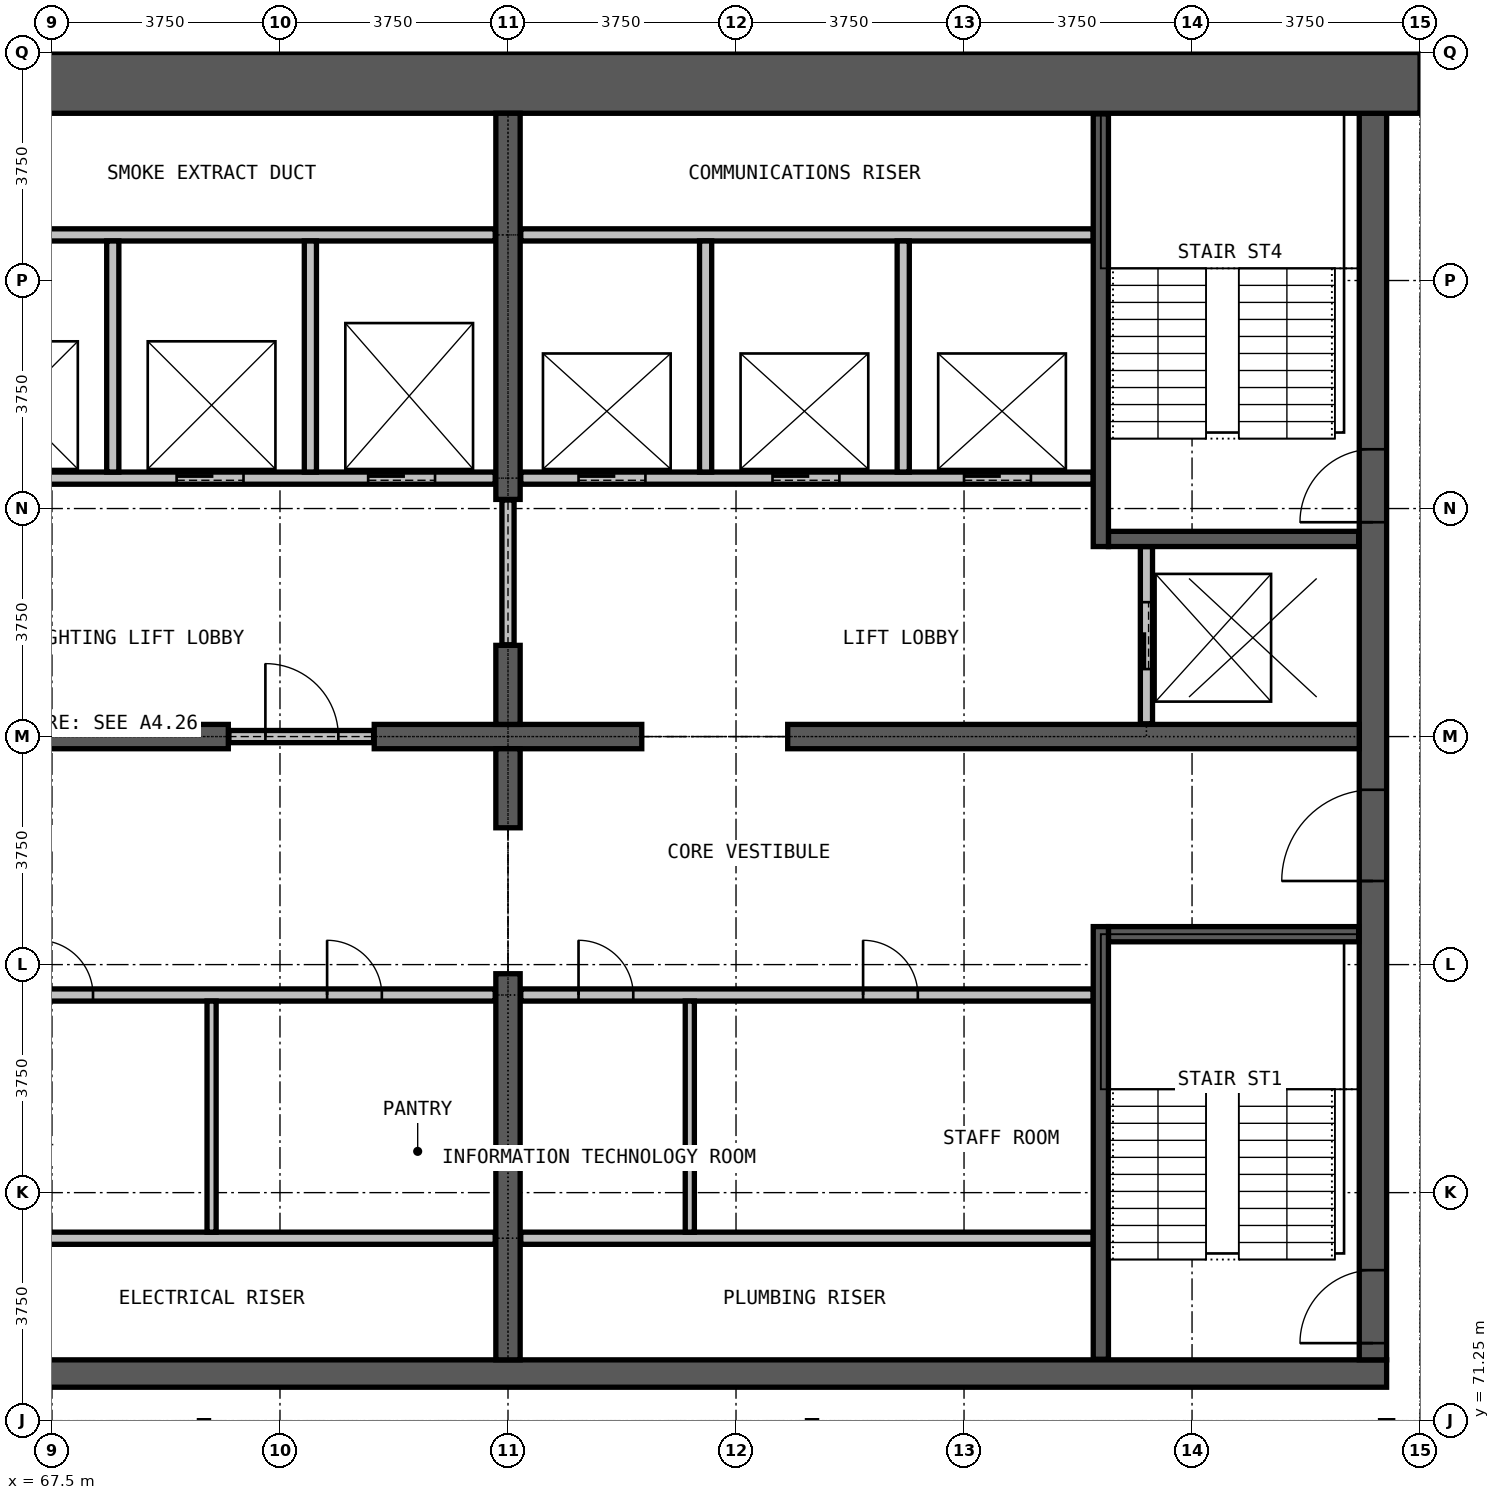
"""IFC4 building model, lengths in metres.
Left out: names, types, materials, properties, quantities, classifications, styles, units other than length and angle.
Written with IfcOpenShell. Run it as: python <this file> out.ifc"""

import sys

from ifc_helpers import new_model, si_unit, direction, frame, frame_2d, origin, place, context, subcontext, project, spatial, rectangle, extrude, element, fill, save


model = new_model("IFC4")
c1 = context("Model", 3, precision=1e-05, world=origin(), true_north=direction((0.0, 1.0)))
c2 = subcontext(c1, "Body", "Model", "MODEL_VIEW")
j1 = project(units=[si_unit("LENGTHUNIT", "METRE"), si_unit("PLANEANGLEUNIT", "RADIAN")], contexts=[c1])
p1 = place(None, origin())
s1 = spatial("IfcSite", under=j1, at=p1, CompositionType="ELEMENT")
p2 = place(p1, origin())
s2 = spatial("IfcBuilding", under=s1, at=p2, CompositionType="ELEMENT")
p3 = place(p2, frame((0.0, 0.0, 262.1)))
s3 = spatial("IfcBuildingStorey", under=s2, at=p3, CompositionType="ELEMENT", Elevation=262.1)
p4 = place(p3, frame((60.55, 72.025, 0.0), z_axis=(0.0, 0.0, 1.0), x_axis=(1.0, 0.0, 0.0)))
e1 = element("IfcWall", 1, at=p4, inside=s3, PredefinedType="SHEAR", context=c2, shape_type="SweptSolid", body=[
    extrude(rectangle(XDim=28.9, YDim=0.45, at=frame_2d((14.45, 0.0))), origin(), (0.0, 0.0, 1.0), 3.6),
])
p5 = place(p3, frame((89.225, 72.25, 0.0), z_axis=(0.0, 0.0, 1.0), x_axis=(0.0, 1.0, 0.0)))
e2 = element("IfcWall", 2, at=p5, inside=s3, PredefinedType="SHEAR", context=c2, shape_type="SweptSolid", body=[
    extrude(rectangle(XDim=20.5, YDim=0.45, at=frame_2d((10.25, 0.0))), origin(), (0.0, 0.0, 1.0), 3.6),
])
p6 = place(p5, frame((0.275, 0.0, 0.0)))
e3 = element("IfcOpeningElement", 3, at=p6, cuts=e2, PredefinedType="OPENING", context=c2, shape_type="SweptSolid", body=[
    extrude(rectangle(XDim=1.2, YDim=2.2, at=frame_2d((0.6, 1.1))), frame((0.0, 0.235, 0.0), z_axis=(0.0, -1.0, 0.0), x_axis=(1.0, 0.0, 0.0)), (0.0, 0.0, 1.0), 0.47),
])
p7 = place(p5, frame((13.775, 0.0, 0.0)))
e4 = element("IfcOpeningElement", 4, at=p7, cuts=e2, PredefinedType="OPENING", context=c2, shape_type="SweptSolid", body=[
    extrude(rectangle(XDim=1.2, YDim=2.2, at=frame_2d((0.6, 1.1))), frame((0.0, 0.235, 0.0), z_axis=(0.0, -1.0, 0.0), x_axis=(1.0, 0.0, 0.0)), (0.0, 0.0, 1.0), 0.47),
])
p8 = place(p5, frame((7.875, 0.0, 0.0)))
e5 = element("IfcOpeningElement", 5, at=p8, cuts=e2, PredefinedType="OPENING", context=c2, shape_type="SweptSolid", body=[
    extrude(rectangle(XDim=1.5, YDim=2.2, at=frame_2d((0.75, 1.1))), frame((0.0, 0.235, 0.0), z_axis=(0.0, -1.0, 0.0), x_axis=(1.0, 0.0, 0.0)), (0.0, 0.0, 1.0), 0.47),
])
p9 = place(p3, frame((90.0, 93.25, 0.0), z_axis=(0.0, 0.0, 1.0), x_axis=(-1.0, 0.0, 0.0)))
e6 = element("IfcWall", 6, at=p9, inside=s3, PredefinedType="SHEAR", context=c2, shape_type="SweptSolid", body=[
    extrude(rectangle(XDim=30.0, YDim=1.0, at=frame_2d((15.0, 0.0))), origin(), (0.0, 0.0, 1.0), 3.6),
])
p10 = place(p3, frame((61.0, 82.5, 0.0), z_axis=(0.0, 0.0, 1.0), x_axis=(1.0, 0.0, 0.0)))
e7 = element("IfcWall", 7, at=p10, inside=s3, PredefinedType="SHEAR", context=c2, shape_type="SweptSolid", body=[
    extrude(rectangle(XDim=9.4, YDim=0.4, at=frame_2d((4.7, 0.0))), origin(), (0.0, 0.0, 1.0), 3.6),
])
p11 = place(p3, frame((72.8, 82.5, 0.0), z_axis=(0.0, 0.0, 1.0), x_axis=(1.0, 0.0, 0.0)))
e8 = element("IfcWall", 8, at=p11, inside=s3, PredefinedType="SHEAR", context=c2, shape_type="SweptSolid", body=[
    extrude(rectangle(XDim=4.4, YDim=0.4, at=frame_2d((2.2, 0.0))), origin(), (0.0, 0.0, 1.0), 3.6),
])
p12 = place(p3, frame((79.6, 82.5, 0.0), z_axis=(0.0, 0.0, 1.0), x_axis=(1.0, 0.0, 0.0)))
e9 = element("IfcWall", 9, at=p12, inside=s3, PredefinedType="SHEAR", context=c2, shape_type="SweptSolid", body=[
    extrude(rectangle(XDim=9.4, YDim=0.4, at=frame_2d((4.7, 0.0))), origin(), (0.0, 0.0, 1.0), 3.6),
])
p13 = place(p3, frame((75.0, 72.25, 0.0), z_axis=(0.0, 0.0, 1.0), x_axis=(0.0, 1.0, 0.0)))
e10 = element("IfcWall", 10, at=p13, inside=s3, PredefinedType="SHEAR", context=c2, shape_type="SweptSolid", body=[
    extrude(rectangle(XDim=6.35, YDim=0.4, at=frame_2d((3.175, 0.0))), origin(), (0.0, 0.0, 1.0), 3.6),
])
for number, where, z_axis, x_axis in (
    (11, (75.0, 81.0, 0.0), (0.0, 0.0, 1.0), (0.0, 1.0, 0.0)),
    (12, (75.0, 82.7, 0.0), (0.0, 0.0, 1.0), (0.0, 1.0, 0.0)),
):
    element("IfcWall", number, at=place(p3, frame(where, z_axis=z_axis, x_axis=x_axis)), inside=s3, PredefinedType="SHEAR", context=c2, shape_type="SweptSolid", body=[
        extrude(rectangle(XDim=1.3, YDim=0.4, at=frame_2d((0.65, 0.0))), origin(), (0.0, 0.0, 1.0), 3.6),
    ])
p14 = place(p3, frame((75.0, 86.4, 0.0), z_axis=(0.0, 0.0, 1.0), x_axis=(0.0, 1.0, 0.0)))
e13 = element("IfcWall", 13, at=p14, inside=s3, PredefinedType="SHEAR", context=c2, shape_type="SweptSolid", body=[
    extrude(rectangle(XDim=6.35, YDim=0.4, at=frame_2d((3.175, 0.0))), origin(), (0.0, 0.0, 1.0), 3.6),
])
for number, where, z_axis, x_axis in (
    (14, (65.375, 74.25, 0.0), (0.0, 0.0, 1.0), (1.0, 0.0, 0.0)),
    (15, (75.21, 74.25, 0.0), (0.0, 0.0, 1.0), (1.0, 0.0, 0.0)),
):
    element("IfcWall", number, at=place(p3, frame(where, z_axis=z_axis, x_axis=x_axis)), inside=s3, PredefinedType="PARTITIONING", context=c2, shape_type="SweptSolid", body=[
        extrude(rectangle(XDim=9.415, YDim=0.2, at=frame_2d((4.708, 0.0))), origin(), (0.0, 0.0, 1.0), 3.3),
    ])
p15 = place(p3, frame((65.375, 78.25, 0.0), z_axis=(0.0, 0.0, 1.0), x_axis=(1.0, 0.0, 0.0)))
e16 = element("IfcWall", 16, at=p15, inside=s3, PredefinedType="PARTITIONING", context=c2, shape_type="SweptSolid", body=[
    extrude(rectangle(XDim=9.415, YDim=0.2, at=frame_2d((4.708, 0.0))), origin(), (0.0, 0.0, 1.0), 3.3),
])
p16 = place(p15, frame((1.9, 0.0, 0.0)))
e17 = element("IfcOpeningElement", 17, at=p16, cuts=e16, PredefinedType="OPENING", context=c2, shape_type="SweptSolid", body=[
    extrude(rectangle(XDim=0.9, YDim=2.2, at=frame_2d((0.45, 1.1))), frame((0.0, 0.11, 0.0), z_axis=(0.0, -1.0, 0.0), x_axis=(1.0, 0.0, 0.0)), (0.0, 0.0, 1.0), 0.22),
])
p17 = place(p15, frame((6.65, 0.0, 0.0)))
e18 = element("IfcOpeningElement", 18, at=p17, cuts=e16, PredefinedType="OPENING", context=c2, shape_type="SweptSolid", body=[
    extrude(rectangle(XDim=0.9, YDim=2.2, at=frame_2d((0.45, 1.1))), frame((0.0, 0.11, 0.0), z_axis=(0.0, -1.0, 0.0), x_axis=(1.0, 0.0, 0.0)), (0.0, 0.0, 1.0), 0.22),
])
p18 = place(p3, frame((75.21, 78.25, 0.0), z_axis=(0.0, 0.0, 1.0), x_axis=(1.0, 0.0, 0.0)))
e19 = element("IfcWall", 19, at=p18, inside=s3, PredefinedType="PARTITIONING", context=c2, shape_type="SweptSolid", body=[
    extrude(rectangle(XDim=9.415, YDim=0.2, at=frame_2d((4.708, 0.0))), origin(), (0.0, 0.0, 1.0), 3.3),
])
p19 = place(p18, frame((0.95, 0.0, 0.0)))
e20 = element("IfcOpeningElement", 20, at=p19, cuts=e19, PredefinedType="OPENING", context=c2, shape_type="SweptSolid", body=[
    extrude(rectangle(XDim=0.9, YDim=2.2, at=frame_2d((0.45, 1.1))), frame((0.0, 0.11, 0.0), z_axis=(0.0, -1.0, 0.0), x_axis=(1.0, 0.0, 0.0)), (0.0, 0.0, 1.0), 0.22),
])
p20 = place(p18, frame((5.63, 0.0, 0.0)))
e21 = element("IfcOpeningElement", 21, at=p20, cuts=e19, PredefinedType="OPENING", context=c2, shape_type="SweptSolid", body=[
    extrude(rectangle(XDim=0.9, YDim=2.2, at=frame_2d((0.45, 1.1))), frame((0.0, 0.11, 0.0), z_axis=(0.0, -1.0, 0.0), x_axis=(1.0, 0.0, 0.0)), (0.0, 0.0, 1.0), 0.22),
])
p21 = place(p3, frame((70.41, 82.5, 0.0), z_axis=(0.0, 0.0, 1.0), x_axis=(1.0, 0.0, 0.0)))
e22 = element("IfcWall", 22, at=p21, inside=s3, PredefinedType="PARTITIONING", context=c2, shape_type="SweptSolid", body=[
    extrude(rectangle(XDim=2.38, YDim=0.2, at=frame_2d((1.19, 0.0))), origin(), (0.0, 0.0, 1.0), 2.4),
])
p22 = place(p21, frame((0.6, 0.0, 0.0)))
e23 = element("IfcOpeningElement", 23, at=p22, cuts=e22, PredefinedType="OPENING", context=c2, shape_type="SweptSolid", body=[
    extrude(rectangle(XDim=1.2, YDim=2.2, at=frame_2d((0.6, 1.1))), frame((0.0, 0.11, 0.0), z_axis=(0.0, -1.0, 0.0), x_axis=(1.0, 0.0, 0.0)), (0.0, 0.0, 1.0), 0.22),
])
p23 = place(p3, frame((75.0, 84.01, 0.0), z_axis=(0.0, 0.0, 1.0), x_axis=(0.0, 1.0, 0.0)))
e24 = element("IfcWall", 24, at=p23, inside=s3, PredefinedType="PARTITIONING", context=c2, shape_type="SweptSolid", body=[
    extrude(rectangle(XDim=2.38, YDim=0.2, at=frame_2d((1.19, 0.0))), origin(), (0.0, 0.0, 1.0), 2.4),
])
for number, where, z_axis, x_axis in (
    (25, (70.125, 74.35, 0.0), (0.0, 0.0, 1.0), (0.0, 1.0, 0.0)),
    (26, (77.99, 74.35, 0.0), (0.0, 0.0, 1.0), (0.0, 1.0, 0.0)),
):
    element("IfcWall", number, at=place(p3, frame(where, z_axis=z_axis, x_axis=x_axis)), inside=s3, PredefinedType="PARTITIONING", context=c2, shape_type="SweptSolid", body=[
        extrude(rectangle(XDim=3.8, YDim=0.15, at=frame_2d((1.9, 0.0))), origin(), (0.0, 0.0, 1.0), 3.3),
    ])
p24 = place(p3, frame((65.375, 86.75, 0.0), z_axis=(0.0, 0.0, 1.0), x_axis=(1.0, 0.0, 0.0)))
e27 = element("IfcWall", 27, at=p24, inside=s3, PredefinedType="PARTITIONING", context=c2, shape_type="SweptSolid", body=[
    extrude(rectangle(XDim=9.415, YDim=0.2, at=frame_2d((4.708, 0.0))), origin(), (0.0, 0.0, 1.0), 3.3),
])
p25 = place(p24, frame((1.0, 0.0, 0.0)))
e28 = element("IfcOpeningElement", 28, at=p25, cuts=e27, PredefinedType="OPENING", context=c2, shape_type="SweptSolid", body=[
    extrude(rectangle(XDim=1.1, YDim=2.2, at=frame_2d((0.55, 1.1))), frame((0.0, 0.11, 0.0), z_axis=(0.0, -1.0, 0.0), x_axis=(1.0, 0.0, 0.0)), (0.0, 0.0, 1.0), 0.22),
])
p26 = place(p24, frame((4.175, 0.0, 0.0)))
e29 = element("IfcOpeningElement", 29, at=p26, cuts=e27, PredefinedType="OPENING", context=c2, shape_type="SweptSolid", body=[
    extrude(rectangle(XDim=1.1, YDim=2.2, at=frame_2d((0.55, 1.1))), frame((0.0, 0.11, 0.0), z_axis=(0.0, -1.0, 0.0), x_axis=(1.0, 0.0, 0.0)), (0.0, 0.0, 1.0), 0.22),
])
p27 = place(p24, frame((7.325, 0.0, 0.0)))
e30 = element("IfcOpeningElement", 30, at=p27, cuts=e27, PredefinedType="OPENING", context=c2, shape_type="SweptSolid", body=[
    extrude(rectangle(XDim=1.1, YDim=2.2, at=frame_2d((0.55, 1.1))), frame((0.0, 0.11, 0.0), z_axis=(0.0, -1.0, 0.0), x_axis=(1.0, 0.0, 0.0)), (0.0, 0.0, 1.0), 0.22),
])
p28 = place(p3, frame((75.21, 86.75, 0.0), z_axis=(0.0, 0.0, 1.0), x_axis=(1.0, 0.0, 0.0)))
e31 = element("IfcWall", 31, at=p28, inside=s3, PredefinedType="PARTITIONING", context=c2, shape_type="SweptSolid", body=[
    extrude(rectangle(XDim=9.415, YDim=0.2, at=frame_2d((4.708, 0.0))), origin(), (0.0, 0.0, 1.0), 3.3),
])
p29 = place(p28, frame((0.95, 0.0, 0.0)))
e32 = element("IfcOpeningElement", 32, at=p29, cuts=e31, PredefinedType="OPENING", context=c2, shape_type="SweptSolid", body=[
    extrude(rectangle(XDim=1.1, YDim=2.2, at=frame_2d((0.55, 1.1))), frame((0.0, 0.11, 0.0), z_axis=(0.0, -1.0, 0.0), x_axis=(1.0, 0.0, 0.0)), (0.0, 0.0, 1.0), 0.22),
])
p30 = place(p28, frame((4.14, 0.0, 0.0)))
e33 = element("IfcOpeningElement", 33, at=p30, cuts=e31, PredefinedType="OPENING", context=c2, shape_type="SweptSolid", body=[
    extrude(rectangle(XDim=1.1, YDim=2.2, at=frame_2d((0.55, 1.1))), frame((0.0, 0.11, 0.0), z_axis=(0.0, -1.0, 0.0), x_axis=(1.0, 0.0, 0.0)), (0.0, 0.0, 1.0), 0.22),
])
p31 = place(p28, frame((7.29, 0.0, 0.0)))
e34 = element("IfcOpeningElement", 34, at=p31, cuts=e31, PredefinedType="OPENING", context=c2, shape_type="SweptSolid", body=[
    extrude(rectangle(XDim=1.1, YDim=2.2, at=frame_2d((0.55, 1.1))), frame((0.0, 0.11, 0.0), z_axis=(0.0, -1.0, 0.0), x_axis=(1.0, 0.0, 0.0)), (0.0, 0.0, 1.0), 0.22),
])
for number, where, z_axis, x_axis in (
    (35, (65.375, 90.75, 0.0), (0.0, 0.0, 1.0), (1.0, 0.0, 0.0)),
    (36, (75.21, 90.75, 0.0), (0.0, 0.0, 1.0), (1.0, 0.0, 0.0)),
):
    element("IfcWall", number, at=place(p3, frame(where, z_axis=z_axis, x_axis=x_axis)), inside=s3, PredefinedType="PARTITIONING", context=c2, shape_type="SweptSolid", body=[
        extrude(rectangle(XDim=9.415, YDim=0.2, at=frame_2d((4.708, 0.0))), origin(), (0.0, 0.0, 1.0), 3.3),
    ])
for number, where, z_axis, x_axis in (
    (37, (68.5, 86.85, 0.0), (0.0, 0.0, 1.0), (0.0, 1.0, 0.0)),
    (38, (71.75, 86.85, 0.0), (0.0, 0.0, 1.0), (0.0, 1.0, 0.0)),
    (39, (78.25, 86.85, 0.0), (0.0, 0.0, 1.0), (0.0, 1.0, 0.0)),
    (40, (81.5, 86.85, 0.0), (0.0, 0.0, 1.0), (0.0, 1.0, 0.0)),
):
    element("IfcWall", number, at=place(p3, frame(where, z_axis=z_axis, x_axis=x_axis)), inside=s3, PredefinedType="PARTITIONING", context=c2, shape_type="SweptSolid", body=[
        extrude(rectangle(XDim=3.8, YDim=0.2, at=frame_2d((1.9, 0.0))), origin(), (0.0, 0.0, 1.0), 3.3),
    ])
p32 = place(p3, frame((85.5, 82.71, 0.0), z_axis=(0.0, 0.0, 1.0), x_axis=(0.0, 1.0, 0.0)))
e41 = element("IfcWall", 41, at=p32, inside=s3, PredefinedType="PARTITIONING", context=c2, shape_type="SweptSolid", body=[
    extrude(rectangle(XDim=2.915, YDim=0.2, at=frame_2d((1.458, 0.0))), origin(), (0.0, 0.0, 1.0), 3.3),
])
p33 = place(p32, frame((0.9, 0.0, 0.0)))
e42 = element("IfcOpeningElement", 42, at=p33, cuts=e41, PredefinedType="OPENING", context=c2, shape_type="SweptSolid", body=[
    extrude(rectangle(XDim=1.1, YDim=2.2, at=frame_2d((0.55, 1.1))), frame((0.0, 0.11, 0.0), z_axis=(0.0, -1.0, 0.0), x_axis=(1.0, 0.0, 0.0)), (0.0, 0.0, 1.0), 0.22),
])
for number, where, z_axis, x_axis in (
    (43, (84.875, 79.25, 0.0), (0.0, 0.0, 1.0), (1.0, 0.0, 0.0)),
    (44, (84.875, 85.75, 0.0), (0.0, 0.0, 1.0), (1.0, 0.0, 0.0)),
):
    element("IfcWall", number, at=place(p3, frame(where, z_axis=z_axis, x_axis=x_axis)), inside=s3, PredefinedType="PARTITIONING", context=c2, shape_type="SweptSolid", body=[
        extrude(rectangle(XDim=4.115, YDim=0.25, at=frame_2d((2.058, 0.0))), origin(), (0.0, 0.0, 1.0), 3.3),
    ])
for number, where, z_axis, x_axis in (
    (45, (84.75, 72.26, 0.0), (0.0, 0.0, 1.0), (0.0, 1.0, 0.0)),
    (46, (84.75, 85.625, 0.0), (0.0, 0.0, 1.0), (0.0, 1.0, 0.0)),
):
    element("IfcWall", number, at=place(p3, frame(where, z_axis=z_axis, x_axis=x_axis)), inside=s3, PredefinedType="PARTITIONING", context=c2, shape_type="SweptSolid", body=[
        extrude(rectangle(XDim=7.115, YDim=0.25, at=frame_2d((3.558, 0.0))), origin(), (0.0, 0.0, 1.0), 3.3),
    ])
p34 = place(p29, origin())
e47 = element("IfcDoor", 47, at=p34, inside=s3, OperationType="DOUBLE_DOOR_SLIDING", PredefinedType="DOOR", context=c2, shape_type="SweptSolid", body=[
    extrude(rectangle(XDim=1.1, YDim=2.2, at=frame_2d((0.55, 1.1))), frame((0.0, 0.025, 0.0), z_axis=(0.0, -1.0, 0.0), x_axis=(1.0, 0.0, 0.0)), (0.0, 0.0, 1.0), 0.05),
])
fill(e32, e47)
p35 = place(p30, origin())
e48 = element("IfcDoor", 48, at=p35, inside=s3, OperationType="DOUBLE_DOOR_SLIDING", PredefinedType="DOOR", context=c2, shape_type="SweptSolid", body=[
    extrude(rectangle(XDim=1.1, YDim=2.2, at=frame_2d((0.55, 1.1))), frame((0.0, 0.025, 0.0), z_axis=(0.0, -1.0, 0.0), x_axis=(1.0, 0.0, 0.0)), (0.0, 0.0, 1.0), 0.05),
])
fill(e33, e48)
p36 = place(p31, origin())
e49 = element("IfcDoor", 49, at=p36, inside=s3, OperationType="DOUBLE_DOOR_SLIDING", PredefinedType="DOOR", context=c2, shape_type="SweptSolid", body=[
    extrude(rectangle(XDim=1.1, YDim=2.2, at=frame_2d((0.55, 1.1))), frame((0.0, 0.025, 0.0), z_axis=(0.0, -1.0, 0.0), x_axis=(1.0, 0.0, 0.0)), (0.0, 0.0, 1.0), 0.05),
])
fill(e34, e49)
p37 = place(p26, origin())
e50 = element("IfcDoor", 50, at=p37, inside=s3, OperationType="DOUBLE_DOOR_SLIDING", PredefinedType="DOOR", context=c2, shape_type="SweptSolid", body=[
    extrude(rectangle(XDim=1.1, YDim=2.2, at=frame_2d((0.55, 1.1))), frame((0.0, 0.025, 0.0), z_axis=(0.0, -1.0, 0.0), x_axis=(1.0, 0.0, 0.0)), (0.0, 0.0, 1.0), 0.05),
])
fill(e29, e50)
p38 = place(p27, origin())
e51 = element("IfcDoor", 51, at=p38, inside=s3, OperationType="DOUBLE_DOOR_SLIDING", PredefinedType="DOOR", context=c2, shape_type="SweptSolid", body=[
    extrude(rectangle(XDim=1.1, YDim=2.2, at=frame_2d((0.55, 1.1))), frame((0.0, 0.025, 0.0), z_axis=(0.0, -1.0, 0.0), x_axis=(1.0, 0.0, 0.0)), (0.0, 0.0, 1.0), 0.05),
])
fill(e30, e51)
p39 = place(p33, origin())
e52 = element("IfcDoor", 52, at=p39, inside=s3, OperationType="DOUBLE_DOOR_SLIDING", PredefinedType="DOOR", context=c2, shape_type="SweptSolid", body=[
    extrude(rectangle(XDim=1.1, YDim=2.2, at=frame_2d((0.55, 1.1))), frame((0.0, 0.025, 0.0), z_axis=(0.0, -1.0, 0.0), x_axis=(1.0, 0.0, 0.0)), (0.0, 0.0, 1.0), 0.05),
])
fill(e42, e52)
p40 = place(p22, origin())
e53 = element("IfcDoor", 53, at=p40, inside=s3, OperationType="SINGLE_SWING_LEFT", PredefinedType="DOOR", context=c2, shape_type="SweptSolid", body=[
    extrude(rectangle(XDim=1.2, YDim=2.2, at=frame_2d((0.6, 1.1))), frame((0.0, 0.025, 0.0), z_axis=(0.0, -1.0, 0.0), x_axis=(1.0, 0.0, 0.0)), (0.0, 0.0, 1.0), 0.05),
])
fill(e23, e53)
p41 = place(p6, origin())
e54 = element("IfcDoor", 54, at=p41, inside=s3, OperationType="SINGLE_SWING_LEFT", PredefinedType="DOOR", context=c2, shape_type="SweptSolid", body=[
    extrude(rectangle(XDim=1.2, YDim=2.2, at=frame_2d((0.6, 1.1))), frame((0.0, 0.025, 0.0), z_axis=(0.0, -1.0, 0.0), x_axis=(1.0, 0.0, 0.0)), (0.0, 0.0, 1.0), 0.05),
])
fill(e3, e54)
p42 = place(p7, origin())
e55 = element("IfcDoor", 55, at=p42, inside=s3, OperationType="SINGLE_SWING_LEFT", PredefinedType="DOOR", context=c2, shape_type="SweptSolid", body=[
    extrude(rectangle(XDim=1.2, YDim=2.2, at=frame_2d((0.6, 1.1))), frame((0.0, 0.025, 0.0), z_axis=(0.0, -1.0, 0.0), x_axis=(1.0, 0.0, 0.0)), (0.0, 0.0, 1.0), 0.05),
])
fill(e4, e55)
p43 = place(p8, origin())
e56 = element("IfcDoor", 56, at=p43, inside=s3, OperationType="DOUBLE_DOOR_SINGLE_SWING", PredefinedType="DOOR", context=c2, shape_type="SweptSolid", body=[
    extrude(rectangle(XDim=1.5, YDim=2.2, at=frame_2d((0.75, 1.1))), frame((0.0, 0.025, 0.0), z_axis=(0.0, -1.0, 0.0), x_axis=(1.0, 0.0, 0.0)), (0.0, 0.0, 1.0), 0.05),
])
fill(e5, e56)
p44 = place(p16, origin())
e57 = element("IfcDoor", 57, at=p44, inside=s3, OperationType="SINGLE_SWING_RIGHT", PredefinedType="DOOR", context=c2, shape_type="SweptSolid", body=[
    extrude(rectangle(XDim=0.9, YDim=2.2, at=frame_2d((0.45, 1.1))), frame((0.0, 0.025, 0.0), z_axis=(0.0, -1.0, 0.0), x_axis=(1.0, 0.0, 0.0)), (0.0, 0.0, 1.0), 0.05),
])
fill(e17, e57)
p45 = place(p17, origin())
e58 = element("IfcDoor", 58, at=p45, inside=s3, OperationType="SINGLE_SWING_LEFT", PredefinedType="DOOR", context=c2, shape_type="SweptSolid", body=[
    extrude(rectangle(XDim=0.9, YDim=2.2, at=frame_2d((0.45, 1.1))), frame((0.0, 0.025, 0.0), z_axis=(0.0, -1.0, 0.0), x_axis=(1.0, 0.0, 0.0)), (0.0, 0.0, 1.0), 0.05),
])
fill(e18, e58)
p46 = place(p19, origin())
e59 = element("IfcDoor", 59, at=p46, inside=s3, OperationType="SINGLE_SWING_RIGHT", PredefinedType="DOOR", context=c2, shape_type="SweptSolid", body=[
    extrude(rectangle(XDim=0.9, YDim=2.2, at=frame_2d((0.45, 1.1))), frame((0.0, 0.025, 0.0), z_axis=(0.0, -1.0, 0.0), x_axis=(1.0, 0.0, 0.0)), (0.0, 0.0, 1.0), 0.05),
])
fill(e20, e59)
p47 = place(p20, origin())
e60 = element("IfcDoor", 60, at=p47, inside=s3, OperationType="SINGLE_SWING_RIGHT", PredefinedType="DOOR", context=c2, shape_type="SweptSolid", body=[
    extrude(rectangle(XDim=0.9, YDim=2.2, at=frame_2d((0.45, 1.1))), frame((0.0, 0.025, 0.0), z_axis=(0.0, -1.0, 0.0), x_axis=(1.0, 0.0, 0.0)), (0.0, 0.0, 1.0), 0.05),
])
fill(e21, e60)
save(model, sys.argv[1])
